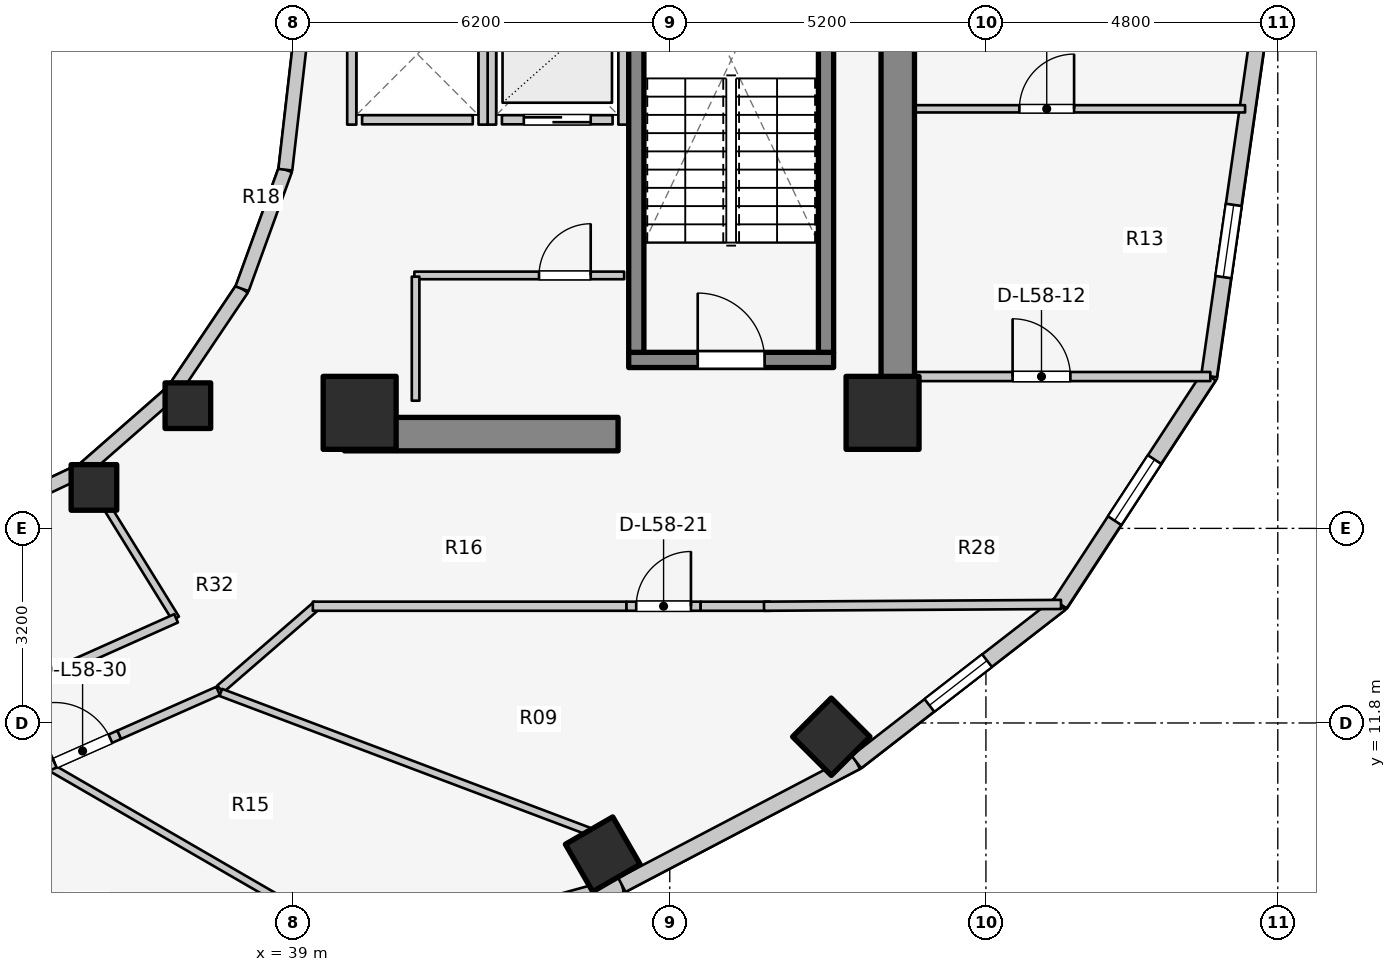
"""IFC4 building model, lengths in metres.
Left out: names, types, materials, properties, quantities, classifications, styles, units other than length and angle.
Written with IfcOpenShell. Run it as: python <this file> out.ifc"""

import sys

from ifc_helpers import new_model, si_unit, direction, frame, frame_2d, origin, origin_2d, place, context, subcontext, project, spatial, rectangle, extrude, element, fill, save


model = new_model("IFC4")
c1 = context("Model", 3, precision=1e-05, world=origin(), true_north=direction((0.0, 1.0)))
c2 = subcontext(c1, "Body", "Model", "MODEL_VIEW")
j1 = project(units=[si_unit("LENGTHUNIT", "METRE"), si_unit("PLANEANGLEUNIT", "RADIAN")], contexts=[c1])
p1 = place(None, origin())
s1 = spatial("IfcSite", under=j1, at=p1, CompositionType="ELEMENT")
p2 = place(p1, origin())
s2 = spatial("IfcBuilding", under=s1, at=p2, CompositionType="ELEMENT")
p3 = place(p2, frame((0.0, 0.0, 190.1)))
s3 = spatial("IfcBuildingStorey", under=s2, at=p3, CompositionType="ELEMENT", Elevation=190.1)
p4 = place(p3, frame((48.95, 17.05, 0.0), z_axis=(0.0, 0.0, 1.0), x_axis=(0.0, 1.0, 0.0)))
e1 = element("IfcWall", 1, at=p4, inside=s3, PredefinedType="SHEAR", context=c2, shape_type="SweptSolid", body=[
    extrude(rectangle(XDim=12.8, YDim=0.55, at=frame_2d((6.4, 0.0))), origin(), (0.0, 0.0, 1.0), 3.1),
])
p5 = place(p3, frame((39.85, 16.55, 0.0), z_axis=(0.0, 0.0, 1.0), x_axis=(1.0, 0.0, 0.0)))
e2 = element("IfcWall", 2, at=p5, inside=s3, PredefinedType="SHEAR", context=c2, shape_type="SweptSolid", body=[
    extrude(rectangle(XDim=4.5, YDim=0.55, at=frame_2d((2.25, 0.0))), origin(), (0.0, 0.0, 1.0), 3.1),
])
p6 = place(p3, frame((44.525, 17.77, 0.0), z_axis=(0.0, 0.0, 1.0), x_axis=(1.0, 0.0, 0.0)))
e3 = element("IfcWall", 3, at=p6, inside=s3, PredefinedType="SOLIDWALL", context=c2, shape_type="SweptSolid", body=[
    extrude(rectangle(XDim=3.37, YDim=0.25, at=frame_2d((1.685, 0.0))), origin(), (0.0, 0.0, 1.0), 3.1),
])
p7 = place(p6, frame((1.135, 0.0, 0.0)))
e4 = element("IfcOpeningElement", 4, at=p7, cuts=e3, PredefinedType="OPENING", context=c2, shape_type="SweptSolid", body=[
    extrude(rectangle(XDim=1.1, YDim=2.1, at=frame_2d((0.55, 1.05))), frame((0.0, 0.135, 0.0), z_axis=(0.0, -1.0, 0.0), x_axis=(1.0, 0.0, 0.0)), (0.0, 0.0, 1.0), 0.27),
])
for number, where, z_axis, x_axis in (
    (5, (44.65, 17.895, 0.0), (0.0, 0.0, 1.0), (0.0, 1.0, 0.0)),
    (6, (47.77, 17.895, 0.0), (0.0, 0.0, 1.0), (0.0, 1.0, 0.0)),
):
    element("IfcWall", number, at=place(p3, frame(where, z_axis=z_axis, x_axis=x_axis)), inside=s3, PredefinedType="SOLIDWALL", context=c2, shape_type="SweptSolid", body=[
        extrude(rectangle(XDim=7.81, YDim=0.25, at=frame_2d((3.905, 0.0))), origin(), (0.0, 0.0, 1.0), 3.1),
    ])
for number, where, z_axis, x_axis in (
    (7, (40.1, 16.9, 0.0), (0.0, 0.0, 1.0), (1.0, 0.0, 0.0)),
    (8, (48.7, 16.9, 0.0), (0.0, 0.0, 1.0), (1.0, 0.0, 0.0)),
):
    element("IfcColumn", number, at=place(p3, frame(where, z_axis=z_axis, x_axis=x_axis)), inside=s3, PredefinedType="COLUMN", context=c2, shape_type="SweptSolid", body=[
        extrude(rectangle(XDim=1.2, YDim=1.2, at=origin_2d()), origin(), (0.0, 0.0, 1.0), 3.1),
    ])
p8 = place(p3, frame((35.73, 15.673, 0.0), z_axis=(0.0, 0.0, 1.0), x_axis=(1.0, 0.0, 0.0)))
e9 = element("IfcColumn", 9, at=p8, inside=s3, PredefinedType="COLUMN", context=c2, shape_type="SweptSolid", body=[
    extrude(rectangle(XDim=0.75, YDim=0.75, at=origin_2d()), origin(), (0.0, 0.0, 1.0), 3.1),
])
p9 = place(p3, frame((44.098, 9.641, 0.0), z_axis=(0.0, 0.0, 1.0), x_axis=(0.5, -0.866025403784, 0.0)))
e10 = element("IfcColumn", 10, at=p9, inside=s3, PredefinedType="COLUMN", context=c2, shape_type="SweptSolid", body=[
    extrude(rectangle(XDim=0.9, YDim=0.9, at=origin_2d()), origin(), (0.0, 0.0, 1.0), 3.1),
])
p10 = place(p3, frame((37.275, 17.018, 0.0), z_axis=(0.0, 0.0, 1.0), x_axis=(1.0, 0.0, 0.0)))
e11 = element("IfcColumn", 11, at=p10, inside=s3, PredefinedType="COLUMN", context=c2, shape_type="SweptSolid", body=[
    extrude(rectangle(XDim=0.75, YDim=0.75, at=origin_2d()), origin(), (0.0, 0.0, 1.0), 3.1),
])
p11 = place(p3, frame((47.857, 11.573, 0.0), z_axis=(0.0, 0.0, 1.0), x_axis=(0.707106781187, -0.707106781187, 0.0)))
e12 = element("IfcColumn", 12, at=p11, inside=s3, PredefinedType="COLUMN", context=c2, shape_type="SweptSolid", body=[
    extrude(rectangle(XDim=0.9, YDim=0.9, at=origin_2d()), origin(), (0.0, 0.0, 1.0), 3.1),
])
p12 = place(p3, frame((33.843, 15.157, 0.0), z_axis=(0.0, 0.0, 1.0), x_axis=(0.904179699603, 0.427152280606, 0.0)))
e13 = element("IfcWall", 13, at=p12, inside=s3, PredefinedType="STANDARD", context=c2, shape_type="SweptSolid", body=[
    extrude(rectangle(XDim=1.899, YDim=0.23, at=frame_2d((0.95, 0.0))), origin(), (0.0, 0.0, 1.0), 1.22),
])
p13 = place(p3, frame((35.56, 15.968, 0.0), z_axis=(0.0, 0.0, 1.0), x_axis=(0.752576694707, 0.658504607869, 0.0)))
e14 = element("IfcWall", 14, at=p13, inside=s3, PredefinedType="STANDARD", context=c2, shape_type="SweptSolid", body=[
    extrude(rectangle(XDim=1.959, YDim=0.23, at=frame_2d((0.98, 0.0))), origin(), (0.0, 0.0, 1.0), 1.22),
])
p14 = place(p3, frame((37.035, 17.258, 0.0), z_axis=(0.0, 0.0, 1.0), x_axis=(0.558197800898, 0.829707909492, 0.0)))
e15 = element("IfcWall", 15, at=p14, inside=s3, PredefinedType="STANDARD", context=c2, shape_type="SweptSolid", body=[
    extrude(rectangle(XDim=2.027, YDim=0.23, at=frame_2d((1.013, 0.0))), origin(), (0.0, 0.0, 1.0), 1.22),
])
p15 = place(p3, frame((38.166, 18.94, 0.0), z_axis=(0.0, 0.0, 1.0), x_axis=(0.341423187295, 0.93990968033, 0.0)))
e16 = element("IfcWall", 16, at=p15, inside=s3, PredefinedType="STANDARD", context=c2, shape_type="SweptSolid", body=[
    extrude(rectangle(XDim=2.084, YDim=0.23, at=frame_2d((1.042, 0.0))), origin(), (0.0, 0.0, 1.0), 2.56),
])
p16 = place(p3, frame((38.877, 20.898, 0.0), z_axis=(0.0, 0.0, 1.0), x_axis=(0.114711713601, 0.993398823617, 0.0)))
e17 = element("IfcWall", 17, at=p16, inside=s3, PredefinedType="STANDARD", context=c2, shape_type="SweptSolid", body=[
    extrude(rectangle(XDim=2.115, YDim=0.23, at=frame_2d((1.058, 0.0))), origin(), (0.0, 0.0, 1.0), 2.56),
])
p17 = place(p3, frame((39.365, 7.743, 0.0), z_axis=(0.0, 0.0, 1.0), x_axis=(0.963953455704, 0.26607092144, 0.0)))
e18 = element("IfcWall", 18, at=p17, inside=s3, PredefinedType="STANDARD", context=c2, shape_type="SweptSolid", body=[
    extrude(rectangle(XDim=5.237, YDim=0.26, at=frame_2d((2.618, 0.0))), origin(), (0.0, 0.0, 1.0), 1.22),
])
p18 = place(p17, frame((2.018, 0.0, 0.15)))
e19 = element("IfcOpeningElement", 19, at=p18, cuts=e18, PredefinedType="OPENING", context=c2, shape_type="SweptSolid", body=[
    extrude(rectangle(XDim=1.2, YDim=0.9, at=frame_2d((0.6, 0.45))), frame((0.0, 0.14, 0.0), z_axis=(0.0, -1.0, 0.0), x_axis=(1.0, 0.0, 0.0)), (0.0, 0.0, 1.0), 0.28),
])
p19 = place(p3, frame((44.413, 9.137, 0.0), z_axis=(0.0, 0.0, 1.0), x_axis=(0.885660265226, 0.464333818065, 0.0)))
e20 = element("IfcWall", 20, at=p19, inside=s3, PredefinedType="STANDARD", context=c2, shape_type="SweptSolid", body=[
    extrude(rectangle(XDim=4.354, YDim=0.26, at=frame_2d((2.177, 0.0))), origin(), (0.0, 0.0, 1.0), 1.22),
])
p20 = place(p3, frame((48.269, 11.158, 0.0), z_axis=(0.0, 0.0, 1.0), x_axis=(0.790185650662, 0.612867552973, 0.0)))
e21 = element("IfcWall", 21, at=p20, inside=s3, PredefinedType="STANDARD", context=c2, shape_type="SweptSolid", body=[
    extrude(rectangle(XDim=4.239, YDim=0.26, at=frame_2d((2.12, 0.0))), origin(), (0.0, 0.0, 1.0), 1.22),
])
p21 = place(p20, frame((1.52, 0.0, 0.15)))
e22 = element("IfcOpeningElement", 22, at=p21, cuts=e21, PredefinedType="OPENING", context=c2, shape_type="SweptSolid", body=[
    extrude(rectangle(XDim=1.2, YDim=0.9, at=frame_2d((0.6, 0.45))), frame((0.0, 0.14, 0.0), z_axis=(0.0, -1.0, 0.0), x_axis=(1.0, 0.0, 0.0)), (0.0, 0.0, 1.0), 0.28),
])
p22 = place(p3, frame((51.619, 13.757, 0.0), z_axis=(0.0, 0.0, 1.0), x_axis=(0.547456494366, 0.836834145322, 0.0)))
e23 = element("IfcWall", 23, at=p22, inside=s3, PredefinedType="STANDARD", context=c2, shape_type="SweptSolid", body=[
    extrude(rectangle(XDim=4.477, YDim=0.26, at=frame_2d((2.239, 0.0))), origin(), (0.0, 0.0, 1.0), 1.22),
])
p23 = place(p22, frame((1.639, 0.0, 0.15)))
e24 = element("IfcOpeningElement", 24, at=p23, cuts=e23, PredefinedType="OPENING", context=c2, shape_type="SweptSolid", body=[
    extrude(rectangle(XDim=1.2, YDim=0.9, at=frame_2d((0.6, 0.45))), frame((0.0, 0.14, 0.0), z_axis=(0.0, -1.0, 0.0), x_axis=(1.0, 0.0, 0.0)), (0.0, 0.0, 1.0), 0.28),
])
p24 = place(p3, frame((54.07, 17.503, 0.0), z_axis=(0.0, 0.0, 1.0), x_axis=(0.142227632286, 0.989833976288, 0.0)))
e25 = element("IfcWall", 25, at=p24, inside=s3, PredefinedType="STANDARD", context=c2, shape_type="SweptSolid", body=[
    extrude(rectangle(XDim=5.553, YDim=0.26, at=frame_2d((2.776, 0.0))), origin(), (0.0, 0.0, 1.0), 2.57),
])
p25 = place(p24, frame((1.646, 0.0, 0.75)))
e26 = element("IfcOpeningElement", 26, at=p25, cuts=e25, PredefinedType="OPENING", context=c2, shape_type="SweptSolid", body=[
    extrude(rectangle(XDim=1.2, YDim=1.5, at=frame_2d((0.6, 0.75))), frame((0.0, 0.14, 0.0), z_axis=(0.0, -1.0, 0.0), x_axis=(1.0, 0.0, 0.0)), (0.0, 0.0, 1.0), 0.28),
])
p26 = place(p3, frame((42.44, 21.72, 0.0), z_axis=(0.0, 0.0, 1.0), x_axis=(1.0, 0.0, 0.0)))
e27 = element("IfcWall", 27, at=p26, inside=s3, PredefinedType="SOLIDWALL", context=c2, shape_type="SweptSolid", body=[
    extrude(rectangle(XDim=1.82, YDim=0.15, at=frame_2d((0.91, 0.0))), origin(), (0.0, 0.0, 1.0), 2.575),
])
p27 = place(p26, frame((0.36, 0.0, 0.0)))
e28 = element("IfcOpeningElement", 28, at=p27, cuts=e27, PredefinedType="OPENING", context=c2, shape_type="SweptSolid", body=[
    extrude(rectangle(XDim=1.1, YDim=2.1, at=frame_2d((0.55, 1.05))), frame((0.0, 0.085, 0.0), z_axis=(0.0, -1.0, 0.0), x_axis=(1.0, 0.0, 0.0)), (0.0, 0.0, 1.0), 0.17),
])
for number, where, z_axis, x_axis in (
    (29, (42.27, 21.64, 0.0), (0.0, 0.0, 1.0), (0.0, 1.0, 0.0)),
    (30, (44.43, 21.64, 0.0), (0.0, 0.0, 1.0), (0.0, 1.0, 0.0)),
):
    element("IfcWall", number, at=place(p3, frame(where, z_axis=z_axis, x_axis=x_axis)), inside=s3, PredefinedType="SOLIDWALL", context=c2, shape_type="SweptSolid", body=[
        extrude(rectangle(XDim=2.32, YDim=0.15, at=frame_2d((1.16, 0.0))), origin(), (0.0, 0.0, 1.0), 2.575),
    ])
p28 = place(p3, frame((40.14, 21.72, 0.0), z_axis=(0.0, 0.0, 1.0), x_axis=(1.0, 0.0, 0.0)))
e31 = element("IfcWall", 31, at=p28, inside=s3, PredefinedType="SOLIDWALL", context=c2, shape_type="SweptSolid", body=[
    extrude(rectangle(XDim=1.82, YDim=0.15, at=frame_2d((0.91, 0.0))), origin(), (0.0, 0.0, 1.0), 2.12),
])
p29 = place(p3, frame((39.97, 21.64, 0.0), z_axis=(0.0, 0.0, 1.0), x_axis=(0.0, 1.0, 0.0)))
e32 = element("IfcWall", 32, at=p29, inside=s3, PredefinedType="SOLIDWALL", context=c2, shape_type="SweptSolid", body=[
    extrude(rectangle(XDim=2.32, YDim=0.15, at=frame_2d((1.16, 0.0))), origin(), (0.0, 0.0, 1.0), 2.12),
])
p30 = place(p3, frame((42.13, 21.64, 0.0), z_axis=(0.0, 0.0, 1.0), x_axis=(0.0, 1.0, 0.0)))
e33 = element("IfcWall", 33, at=p30, inside=s3, PredefinedType="SOLIDWALL", context=c2, shape_type="SweptSolid", body=[
    extrude(rectangle(XDim=2.32, YDim=0.15, at=frame_2d((1.16, 0.0))), origin(), (0.0, 0.0, 1.0), 2.575),
])
p31 = place(p3, frame((41.0, 19.16, 0.0), z_axis=(0.0, 0.0, 1.0), x_axis=(1.0, 0.0, 0.0)))
e34 = element("IfcWall", 34, at=p31, inside=s3, PredefinedType="PARTITIONING", context=c2, shape_type="SweptSolid", body=[
    extrude(rectangle(XDim=3.45, YDim=0.125, at=frame_2d((1.725, 0.0))), origin(), (0.0, 0.0, 1.0), 2.12),
])
p32 = place(p31, frame((2.05, 0.0, 0.0)))
e35 = element("IfcOpeningElement", 35, at=p32, cuts=e34, PredefinedType="OPENING", context=c2, shape_type="SweptSolid", body=[
    extrude(rectangle(XDim=0.85, YDim=2.05, at=frame_2d((0.425, 1.025))), frame((0.0, 0.073, 0.0), z_axis=(0.0, -1.0, 0.0), x_axis=(1.0, 0.0, 0.0)), (0.0, 0.0, 1.0), 0.145),
])
p33 = place(p3, frame((41.02, 17.1, 0.0), z_axis=(0.0, 0.0, 1.0), x_axis=(0.0, 1.0, 0.0)))
e36 = element("IfcWall", 36, at=p33, inside=s3, PredefinedType="PARTITIONING", context=c2, shape_type="SweptSolid", body=[
    extrude(rectangle(XDim=2.04, YDim=0.125, at=frame_2d((1.02, 0.0))), origin(), (0.0, 0.0, 1.0), 2.575),
])
p34 = place(p3, frame((48.95, 17.497, 0.0), z_axis=(0.0, 0.0, 1.0), x_axis=(1.0, 0.0, 0.0)))
e37 = element("IfcWall", 37, at=p34, inside=s3, PredefinedType="PARTITIONING", context=c2, shape_type="SweptSolid", body=[
    extrude(rectangle(XDim=5.14, YDim=0.15, at=frame_2d((2.57, 0.0))), origin(), (0.0, 0.0, 1.0), 2.575),
])
p35 = place(p34, frame((1.889, 0.0, 0.0)))
e38 = element("IfcOpeningElement", 38, at=p35, cuts=e37, PredefinedType="OPENING", context=c2, shape_type="SweptSolid", body=[
    extrude(rectangle(XDim=0.95, YDim=2.1, at=frame_2d((0.475, 1.05))), frame((0.0, 0.085, 0.0), z_axis=(0.0, -1.0, 0.0), x_axis=(1.0, 0.0, 0.0)), (0.0, 0.0, 1.0), 0.17),
])
p36 = place(p3, frame((48.95, 21.9, 0.0), z_axis=(0.0, 0.0, 1.0), x_axis=(1.0, 0.0, 0.0)))
e39 = element("IfcWall", 39, at=p36, inside=s3, PredefinedType="MOVABLE", context=c2, shape_type="SweptSolid", body=[
    extrude(rectangle(XDim=5.712, YDim=0.12, at=frame_2d((2.856, 0.0))), origin(), (0.0, 0.0, 1.0), 2.575),
])
p37 = place(p36, frame((2.0, 0.0, 0.0)))
e40 = element("IfcOpeningElement", 40, at=p37, cuts=e39, PredefinedType="OPENING", context=c2, shape_type="SweptSolid", body=[
    extrude(rectangle(XDim=0.9, YDim=2.1, at=frame_2d((0.45, 1.05))), frame((0.0, 0.07, 0.0), z_axis=(0.0, -1.0, 0.0), x_axis=(1.0, 0.0, 0.0)), (0.0, 0.0, 1.0), 0.14),
])
p38 = place(p3, frame((37.807, 12.358, 0.0), z_axis=(0.0, 0.0, 1.0), x_axis=(0.756055312247, 0.654507727092, 0.0)))
e41 = element("IfcWall", 41, at=p38, inside=s3, PredefinedType="PARTITIONING", context=c2, shape_type="SweptSolid", body=[
    extrude(rectangle(XDim=2.111, YDim=0.15, at=frame_2d((1.055, 0.0))), origin(), (0.0, 0.0, 1.0), 1.22),
])
p39 = place(p3, frame((39.33, 13.72, 0.0), z_axis=(0.0, 0.0, 1.0), x_axis=(1.0, 0.0, 0.0)))
e42 = element("IfcWall", 42, at=p39, inside=s3, PredefinedType="PARTITIONING", context=c2, shape_type="SweptSolid", body=[
    extrude(rectangle(XDim=5.158, YDim=0.15, at=frame_2d((2.579, 0.0))), origin(), (0.0, 0.0, 1.0), 1.22),
])
p40 = place(p3, frame((44.489, 13.72, 0.0), z_axis=(0.0, 0.0, 1.0), x_axis=(1.0, 0.0, 0.0)))
e43 = element("IfcWall", 43, at=p40, inside=s3, PredefinedType="PARTITIONING", context=c2, shape_type="SweptSolid", body=[
    extrude(rectangle(XDim=1.22, YDim=0.15, at=frame_2d((0.61, 0.0))), origin(), (0.0, 0.0, 1.0), 2.16),
])
p41 = place(p40, frame((0.16, 0.0, 0.0)))
e44 = element("IfcOpeningElement", 44, at=p41, cuts=e43, PredefinedType="OPENING", context=c2, shape_type="SweptSolid", body=[
    extrude(rectangle(XDim=0.9, YDim=2.1, at=frame_2d((0.45, 1.05))), frame((0.0, 0.085, 0.0), z_axis=(0.0, -1.0, 0.0), x_axis=(1.0, 0.0, 0.0)), (0.0, 0.0, 1.0), 0.17),
])
p42 = place(p3, frame((45.708, 13.72, 0.0), z_axis=(0.0, 0.0, 1.0), x_axis=(1.0, 0.0, 0.0)))
e45 = element("IfcWall", 45, at=p42, inside=s3, PredefinedType="PARTITIONING", context=c2, shape_type="SweptSolid", body=[
    extrude(rectangle(XDim=1.142, YDim=0.15, at=frame_2d((0.571, 0.0))), origin(), (0.0, 0.0, 1.0), 2.575),
])
p43 = place(p3, frame((46.75, 13.72, 0.0), z_axis=(0.0, 0.0, 1.0), x_axis=(0.999981712056, 0.006047772638, 0.0)))
e46 = element("IfcWall", 46, at=p43, inside=s3, PredefinedType="PARTITIONING", context=c2, shape_type="SweptSolid", body=[
    extrude(rectangle(XDim=4.885, YDim=0.15, at=frame_2d((2.442, 0.0))), origin(), (0.0, 0.0, 1.0), 1.22),
])
p44 = place(p3, frame((35.55, 15.985, 0.0), z_axis=(0.0, 0.0, 1.0), x_axis=(0.525627246902, -0.850714991824, 0.0)))
e47 = element("IfcWall", 47, at=p44, inside=s3, PredefinedType="PARTITIONING", context=c2, shape_type="SweptSolid", body=[
    extrude(rectangle(XDim=2.901, YDim=0.125, at=frame_2d((1.451, 0.0))), origin(), (0.0, 0.0, 1.0), 1.22),
])
p45 = place(p3, frame((34.625, 12.423, 0.0), z_axis=(0.0, 0.0, 1.0), x_axis=(0.912888568324, 0.408208845842, 0.0)))
e48 = element("IfcWall", 48, at=p45, inside=s3, PredefinedType="PARTITIONING", context=c2, shape_type="SweptSolid", body=[
    extrude(rectangle(XDim=2.69, YDim=0.15, at=frame_2d((1.345, 0.0))), origin(), (0.0, 0.0, 1.0), 1.22),
])
p46 = place(p3, frame((35.032, 11.062, 0.0), z_axis=(0.0, 0.0, 1.0), x_axis=(0.865627016774, -0.500689392568, 0.0)))
e49 = element("IfcWall", 49, at=p46, inside=s3, PredefinedType="PARTITIONING", context=c2, shape_type="SweptSolid", body=[
    extrude(rectangle(XDim=4.662, YDim=0.125, at=frame_2d((2.331, 0.0))), origin(), (0.0, 0.0, 1.0), 1.22),
])
p47 = place(p3, frame((37.816, 12.302, 0.0), z_axis=(0.0, 0.0, 1.0), x_axis=(0.935601484289, -0.353057874288, 0.0)))
e50 = element("IfcWall", 50, at=p47, inside=s3, PredefinedType="PARTITIONING", context=c2, shape_type="SweptSolid", body=[
    extrude(rectangle(XDim=6.484, YDim=0.125, at=frame_2d((3.242, 0.0))), origin(), (0.0, 0.0, 1.0), 1.22),
])
p48 = place(p3, frame((34.976, 11.088, 0.0), z_axis=(0.0, 0.0, 1.0), x_axis=(0.91435342481, 0.40491704649, 0.0)))
e51 = element("IfcWall", 51, at=p48, inside=s3, PredefinedType="PARTITIONING", context=c2, shape_type="SweptSolid", body=[
    extrude(rectangle(XDim=1.28, YDim=0.15, at=frame_2d((0.64, 0.0))), origin(), (0.0, 0.0, 1.0), 2.16),
])
p49 = place(p48, frame((0.12, 0.0, 0.0)))
e52 = element("IfcOpeningElement", 52, at=p49, cuts=e51, PredefinedType="OPENING", context=c2, shape_type="SweptSolid", body=[
    extrude(rectangle(XDim=1.0, YDim=2.1, at=frame_2d((0.5, 1.05))), frame((0.0, 0.085, 0.0), z_axis=(0.0, -1.0, 0.0), x_axis=(1.0, 0.0, 0.0)), (0.0, 0.0, 1.0), 0.17),
])
p50 = place(p3, frame((36.147, 11.606, 0.0), z_axis=(0.0, 0.0, 1.0), x_axis=(0.914303617865, 0.405029498135, 0.0)))
e53 = element("IfcWall", 53, at=p50, inside=s3, PredefinedType="PARTITIONING", context=c2, shape_type="SweptSolid", body=[
    extrude(rectangle(XDim=1.778, YDim=0.15, at=frame_2d((0.889, 0.0))), origin(), (0.0, 0.0, 1.0), 1.22),
])
p51 = place(p21, origin())
e54 = element("IfcWindow", 54, at=p51, inside=s3, PartitioningType="SINGLE_PANEL", PredefinedType="WINDOW", context=c2, shape_type="SweptSolid", body=[
    extrude(rectangle(XDim=1.2, YDim=0.9, at=frame_2d((0.6, 0.45))), frame((0.0, 0.03, 0.0), z_axis=(0.0, -1.0, 0.0), x_axis=(1.0, 0.0, 0.0)), (0.0, 0.0, 1.0), 0.06),
])
fill(e22, e54)
p52 = place(p23, origin())
e55 = element("IfcWindow", 55, at=p52, inside=s3, PartitioningType="SINGLE_PANEL", PredefinedType="WINDOW", context=c2, shape_type="SweptSolid", body=[
    extrude(rectangle(XDim=1.2, YDim=0.9, at=frame_2d((0.6, 0.45))), frame((0.0, 0.03, 0.0), z_axis=(0.0, -1.0, 0.0), x_axis=(1.0, 0.0, 0.0)), (0.0, 0.0, 1.0), 0.06),
])
fill(e24, e55)
p53 = place(p25, origin())
e56 = element("IfcWindow", 56, at=p53, inside=s3, PartitioningType="SINGLE_PANEL", PredefinedType="WINDOW", context=c2, shape_type="SweptSolid", body=[
    extrude(rectangle(XDim=1.2, YDim=1.5, at=frame_2d((0.6, 0.75))), frame((0.0, 0.03, 0.0), z_axis=(0.0, -1.0, 0.0), x_axis=(1.0, 0.0, 0.0)), (0.0, 0.0, 1.0), 0.06),
])
fill(e26, e56)
p54 = place(p7, origin())
e57 = element("IfcDoor", 57, at=p54, inside=s3, OperationType="SINGLE_SWING_LEFT", PredefinedType="DOOR", context=c2, shape_type="SweptSolid", body=[
    extrude(rectangle(XDim=1.1, YDim=2.1, at=frame_2d((0.55, 1.05))), frame((0.0, 0.025, 0.0), z_axis=(0.0, -1.0, 0.0), x_axis=(1.0, 0.0, 0.0)), (0.0, 0.0, 1.0), 0.05),
])
fill(e4, e57)
p55 = place(p27, origin())
e58 = element("IfcDoor", 58, at=p55, inside=s3, OperationType="DOUBLE_DOOR_SLIDING", PredefinedType="DOOR", context=c2, shape_type="SweptSolid", body=[
    extrude(rectangle(XDim=1.1, YDim=2.1, at=frame_2d((0.55, 1.05))), frame((0.0, 0.025, 0.0), z_axis=(0.0, -1.0, 0.0), x_axis=(1.0, 0.0, 0.0)), (0.0, 0.0, 1.0), 0.05),
])
fill(e28, e58)
p56 = place(p32, origin())
e59 = element("IfcDoor", 59, at=p56, inside=s3, OperationType="SINGLE_SWING_RIGHT", PredefinedType="DOOR", context=c2, shape_type="SweptSolid", body=[
    extrude(rectangle(XDim=0.85, YDim=2.05, at=frame_2d((0.425, 1.025))), frame((0.0, 0.025, 0.0), z_axis=(0.0, -1.0, 0.0), x_axis=(1.0, 0.0, 0.0)), (0.0, 0.0, 1.0), 0.05),
])
fill(e35, e59)
p57 = place(p35, origin())
e60 = element("IfcDoor", 60, at=p57, inside=s3, OperationType="SINGLE_SWING_LEFT", PredefinedType="DOOR", context=c2, shape_type="SweptSolid", body=[
    extrude(rectangle(XDim=0.95, YDim=2.1, at=frame_2d((0.475, 1.05))), frame((0.0, 0.025, 0.0), z_axis=(0.0, -1.0, 0.0), x_axis=(1.0, 0.0, 0.0)), (0.0, 0.0, 1.0), 0.05),
])
fill(e38, e60)
p58 = place(p37, origin())
e61 = element("IfcDoor", 61, at=p58, inside=s3, OperationType="SINGLE_SWING_RIGHT", PredefinedType="DOOR", context=c2, shape_type="SweptSolid", body=[
    extrude(rectangle(XDim=0.9, YDim=2.1, at=frame_2d((0.45, 1.05))), frame((0.0, 0.025, 0.0), z_axis=(0.0, -1.0, 0.0), x_axis=(1.0, 0.0, 0.0)), (0.0, 0.0, 1.0), 0.05),
])
fill(e40, e61)
p59 = place(p41, origin())
e62 = element("IfcDoor", 62, at=p59, inside=s3, OperationType="SINGLE_SWING_RIGHT", PredefinedType="DOOR", context=c2, shape_type="SweptSolid", body=[
    extrude(rectangle(XDim=0.9, YDim=2.1, at=frame_2d((0.45, 1.05))), frame((0.0, 0.025, 0.0), z_axis=(0.0, -1.0, 0.0), x_axis=(1.0, 0.0, 0.0)), (0.0, 0.0, 1.0), 0.05),
])
fill(e44, e62)
p60 = place(p49, origin())
e63 = element("IfcDoor", 63, at=p60, inside=s3, OperationType="SINGLE_SWING_LEFT", PredefinedType="DOOR", context=c2, shape_type="SweptSolid", body=[
    extrude(rectangle(XDim=1.0, YDim=2.1, at=frame_2d((0.5, 1.05))), frame((0.0, 0.025, 0.0), z_axis=(0.0, -1.0, 0.0), x_axis=(1.0, 0.0, 0.0)), (0.0, 0.0, 1.0), 0.05),
])
fill(e52, e63)
save(model, sys.argv[1])
